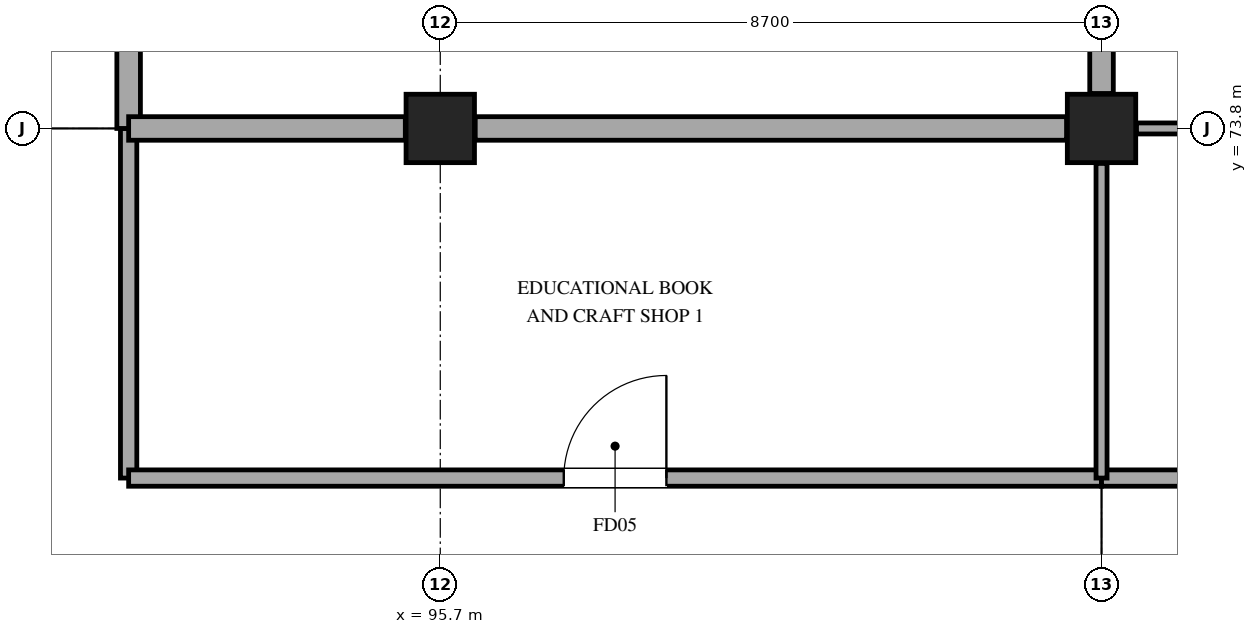
"""IFC4 building model, lengths in metres.
Left out: names, types, materials, properties, quantities, classifications, styles, units other than length and angle.
Written with IfcOpenShell. Run it as: python <this file> out.ifc"""

import sys

from ifc_helpers import new_model, si_unit, direction, frame, frame_2d, origin, origin_2d, place, context, subcontext, project, spatial, rectangle, extrude, element, fill, save


model = new_model("IFC4")
c1 = context("Model", 3, precision=1e-05, world=origin(), true_north=direction((0.0, 1.0)))
c2 = subcontext(c1, "Body", "Model", "MODEL_VIEW")
j1 = project(units=[si_unit("LENGTHUNIT", "METRE"), si_unit("PLANEANGLEUNIT", "RADIAN")], contexts=[c1])
p1 = place(None, origin())
s1 = spatial("IfcSite", under=j1, at=p1, CompositionType="ELEMENT")
p2 = place(p1, origin())
s2 = spatial("IfcBuilding", under=s1, at=p2, CompositionType="ELEMENT")
p3 = place(p2, frame((0.0, 0.0, 11.4)))
s3 = spatial("IfcBuildingStorey", under=s2, at=p3, CompositionType="ELEMENT", Elevation=11.4)
for number, where, z_axis, x_axis in (
    (1, (95.7, 73.8, 0.0), (0.0, 0.0, 1.0), (1.0, 0.0, 0.0)),
    (2, (104.4, 73.8, 0.0), (0.0, 0.0, 1.0), (1.0, 0.0, 0.0)),
):
    element("IfcColumn", number, at=place(p3, frame(where, z_axis=z_axis, x_axis=x_axis)), inside=s3, PredefinedType="COLUMN", context=c2, shape_type="SweptSolid", body=[
        extrude(rectangle(XDim=0.9, YDim=0.9, at=origin_2d()), origin(), (0.0, 0.0, 1.0), 5.1),
    ])
p4 = place(p3, frame((91.6, 73.8, 0.0), z_axis=(0.0, 0.0, 1.0), x_axis=(0.0, -1.0, 0.0)))
e3 = element("IfcWall", 3, at=p4, inside=s3, PredefinedType="PARTITIONING", context=c2, shape_type="SweptSolid", body=[
    extrude(rectangle(XDim=4.6, YDim=0.215, at=frame_2d((2.3, 0.0))), origin(), (0.0, 0.0, 1.0), 4.16),
])
p5 = place(p3, frame((91.6, 69.2, 0.0), z_axis=(0.0, 0.0, 1.0), x_axis=(1.0, 0.0, 0.0)))
e4 = element("IfcWall", 4, at=p5, inside=s3, PredefinedType="PARTITIONING", context=c2, shape_type="SweptSolid", body=[
    extrude(rectangle(XDim=12.8, YDim=0.215, at=frame_2d((6.4, 0.0))), origin(), (0.0, 0.0, 1.0), 4.06),
])
p6 = place(p5, frame((5.725, 0.0, 0.0)))
e5 = element("IfcOpeningElement", 5, at=p6, cuts=e4, PredefinedType="OPENING", context=c2, shape_type="SweptSolid", body=[
    extrude(rectangle(XDim=1.35, YDim=2.2, at=frame_2d((0.675, 1.1))), frame((0.0, 0.118, 0.0), z_axis=(0.0, -1.0, 0.0), x_axis=(1.0, 0.0, 0.0)), (0.0, 0.0, 1.0), 0.235),
])
p7 = place(p3, frame((91.6, 94.8, 0.0), z_axis=(0.0, 0.0, 1.0), x_axis=(0.0, -1.0, 0.0)))
e6 = element("IfcWall", 6, at=p7, inside=s3, PredefinedType="STANDARD", context=c2, shape_type="SweptSolid", body=[
    extrude(rectangle(XDim=21.0, YDim=0.31, at=frame_2d((10.5, 0.0))), origin(), (0.0, 0.0, 1.0), 4.06),
])
p8 = place(p7, frame((9.575, 0.0, 0.0)))
e7 = element("IfcOpeningElement", 7, at=p8, cuts=e6, PredefinedType="OPENING", context=c2, shape_type="SweptSolid", body=[
    extrude(rectangle(XDim=1.85, YDim=2.3, at=frame_2d((0.925, 1.15))), frame((0.0, 0.165, 0.0), z_axis=(0.0, -1.0, 0.0), x_axis=(1.0, 0.0, 0.0)), (0.0, 0.0, 1.0), 0.33),
])
p9 = place(p3, frame((104.4, 69.2, 0.0), z_axis=(0.0, 0.0, 1.0), x_axis=(1.0, 0.0, 0.0)))
e8 = element("IfcWall", 8, at=p9, inside=s3, PredefinedType="PARTITIONING", context=c2, shape_type="SweptSolid", body=[
    extrude(rectangle(XDim=12.8, YDim=0.215, at=frame_2d((6.4, 0.0))), origin(), (0.0, 0.0, 1.0), 4.06),
])
p10 = place(p9, frame((5.725, 0.0, 0.0)))
e9 = element("IfcOpeningElement", 9, at=p10, cuts=e8, PredefinedType="OPENING", context=c2, shape_type="SweptSolid", body=[
    extrude(rectangle(XDim=1.35, YDim=2.2, at=frame_2d((0.675, 1.1))), frame((0.0, 0.118, 0.0), z_axis=(0.0, -1.0, 0.0), x_axis=(1.0, 0.0, 0.0)), (0.0, 0.0, 1.0), 0.235),
])
p11 = place(p3, frame((91.6, 73.8, 0.0), z_axis=(0.0, 0.0, 1.0), x_axis=(1.0, 0.0, 0.0)))
e10 = element("IfcWall", 10, at=p11, inside=s3, PredefinedType="STANDARD", context=c2, shape_type="SweptSolid", body=[
    extrude(rectangle(XDim=3.64, YDim=0.31, at=frame_2d((1.82, 0.0))), origin(), (0.0, 0.0, 1.0), 4.16),
])
p12 = place(p3, frame((96.16, 73.8, 0.0), z_axis=(0.0, 0.0, 1.0), x_axis=(1.0, 0.0, 0.0)))
e11 = element("IfcWall", 11, at=p12, inside=s3, PredefinedType="STANDARD", context=c2, shape_type="SweptSolid", body=[
    extrude(rectangle(XDim=7.78, YDim=0.31, at=frame_2d((3.89, 0.0))), origin(), (0.0, 0.0, 1.0), 4.16),
])
p13 = place(p3, frame((104.4, 73.34, 0.0), z_axis=(0.0, 0.0, 1.0), x_axis=(0.0, -1.0, 0.0)))
e12 = element("IfcWall", 12, at=p13, inside=s3, PredefinedType="PARTITIONING", context=c2, shape_type="SweptSolid", body=[
    extrude(rectangle(XDim=4.14, YDim=0.145, at=frame_2d((2.07, 0.0))), origin(), (0.0, 0.0, 1.0), 4.16),
])
p14 = place(p3, frame((104.4, 81.74, 0.0), z_axis=(0.0, 0.0, 1.0), x_axis=(0.0, -1.0, 0.0)))
e13 = element("IfcWall", 13, at=p14, inside=s3, PredefinedType="STANDARD", context=c2, shape_type="SweptSolid", body=[
    extrude(rectangle(XDim=7.48, YDim=0.31, at=frame_2d((3.74, 0.0))), origin(), (0.0, 0.0, 1.0), 4.175),
])
p15 = place(p3, frame((112.64, 73.8, 0.0), z_axis=(0.0, 0.0, 1.0), x_axis=(-1.0, 0.0, 0.0)))
e14 = element("IfcWall", 14, at=p15, inside=s3, PredefinedType="PARTITIONING", context=c2, shape_type="SweptSolid", body=[
    extrude(rectangle(XDim=7.78, YDim=0.145, at=frame_2d((3.89, 0.0))), origin(), (0.0, 0.0, 1.0), 4.175),
])
p16 = place(p6, origin())
e15 = element("IfcDoor", 15, at=p16, inside=s3, OperationType="SINGLE_SWING_RIGHT", PredefinedType="DOOR", context=c2, shape_type="SweptSolid", body=[
    extrude(rectangle(XDim=1.35, YDim=2.2, at=frame_2d((0.675, 1.1))), frame((0.0, 0.025, 0.0), z_axis=(0.0, -1.0, 0.0), x_axis=(1.0, 0.0, 0.0)), (0.0, 0.0, 1.0), 0.05),
])
fill(e5, e15)
save(model, sys.argv[1])
